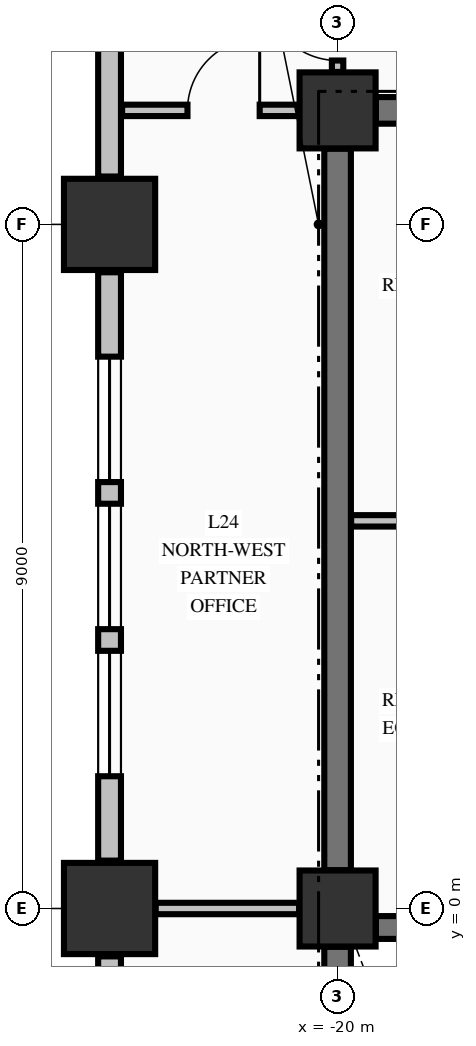
"""IFC4 building model, lengths in metres.
Left out: names, types, materials, properties, quantities, classifications, styles, units other than length and angle.
Written with IfcOpenShell. Run it as: python <this file> out.ifc"""

import sys

from ifc_helpers import new_model, si_unit, direction, frame, frame_2d, origin, origin_2d, place, context, subcontext, project, spatial, rectangle, extrude, element, fill, save


model = new_model("IFC4")
c1 = context("Model", 3, precision=1e-05, world=origin(), true_north=direction((0.0, 1.0)))
c2 = subcontext(c1, "Body", "Model", "MODEL_VIEW")
j1 = project(units=[si_unit("LENGTHUNIT", "METRE"), si_unit("PLANEANGLEUNIT", "RADIAN")], contexts=[c1])
p1 = place(None, origin())
s1 = spatial("IfcSite", under=j1, at=p1, CompositionType="ELEMENT")
p2 = place(p1, origin())
s2 = spatial("IfcBuilding", under=s1, at=p2, CompositionType="ELEMENT")
p3 = place(p2, frame((0.0, 0.0, 98.5)))
s3 = spatial("IfcBuildingStorey", under=s2, at=p3, CompositionType="ELEMENT", Elevation=98.5)
for number, where, z_axis, x_axis in (
    (1, (-23.0, 0.0, -0.275), (0.0, 0.0, 1.0), (1.0, 0.0, 0.0)),
    (2, (-23.0, 9.0, -0.275), (0.0, 0.0, 1.0), (1.0, 0.0, 0.0)),
):
    element("IfcColumn", number, at=place(p3, frame(where, z_axis=z_axis, x_axis=x_axis)), inside=s3, PredefinedType="COLUMN", context=c2, shape_type="SweptSolid", body=[
        extrude(rectangle(XDim=1.2, YDim=1.2, at=origin_2d()), origin(), (0.0, 0.0, 1.0), 3.595),
    ])
for number, where, z_axis, x_axis in (
    (3, (-20.0, 10.5, -0.275), (0.0, 0.0, 1.0), (1.0, 0.0, 0.0)),
    (4, (-20.0, 0.0, -0.275), (0.0, 0.0, 1.0), (1.0, 0.0, 0.0)),
):
    element("IfcColumn", number, at=place(p3, frame(where, z_axis=z_axis, x_axis=x_axis)), inside=s3, PredefinedType="COLUMN", context=c2, shape_type="SweptSolid", body=[
        extrude(rectangle(XDim=1.0, YDim=1.0, at=origin_2d()), origin(), (0.0, 0.0, 1.0), 3.595),
    ])
p4 = place(p3, frame((-23.0, -0.63, 0.0), z_axis=(0.0, 0.0, 1.0), x_axis=(0.0, -1.0, 0.0)))
e5 = element("IfcWall", 5, at=p4, inside=s3, PredefinedType="STANDARD", context=c2, shape_type="SweptSolid", body=[
    extrude(rectangle(XDim=7.74, YDim=0.3, at=frame_2d((3.87, 0.0))), origin(), (0.0, 0.0, 1.0), 2.712),
])
p5 = place(p4, frame((1.11, 0.0, 0.8)))
e6 = element("IfcOpeningElement", 6, at=p5, cuts=e5, PredefinedType="OPENING", context=c2, shape_type="SweptSolid", body=[
    extrude(rectangle(XDim=1.65, YDim=1.7, at=frame_2d((0.825, 0.85))), frame((0.0, 0.16, 0.0), z_axis=(0.0, -1.0, 0.0), x_axis=(1.0, 0.0, 0.0)), (0.0, 0.0, 1.0), 0.32),
])
p6 = place(p4, frame((3.045, 0.0, 0.8)))
e7 = element("IfcOpeningElement", 7, at=p6, cuts=e5, PredefinedType="OPENING", context=c2, shape_type="SweptSolid", body=[
    extrude(rectangle(XDim=1.65, YDim=1.7, at=frame_2d((0.825, 0.85))), frame((0.0, 0.16, 0.0), z_axis=(0.0, -1.0, 0.0), x_axis=(1.0, 0.0, 0.0)), (0.0, 0.0, 1.0), 0.32),
])
p7 = place(p4, frame((4.98, 0.0, 0.8)))
e8 = element("IfcOpeningElement", 8, at=p7, cuts=e5, PredefinedType="OPENING", context=c2, shape_type="SweptSolid", body=[
    extrude(rectangle(XDim=1.65, YDim=1.7, at=frame_2d((0.825, 0.85))), frame((0.0, 0.16, 0.0), z_axis=(0.0, -1.0, 0.0), x_axis=(1.0, 0.0, 0.0)), (0.0, 0.0, 1.0), 0.32),
])
p8 = place(p3, frame((-23.0, 8.37, 0.0), z_axis=(0.0, 0.0, 1.0), x_axis=(0.0, -1.0, 0.0)))
e9 = element("IfcWall", 9, at=p8, inside=s3, PredefinedType="STANDARD", context=c2, shape_type="SweptSolid", body=[
    extrude(rectangle(XDim=7.74, YDim=0.3, at=frame_2d((3.87, 0.0))), origin(), (0.0, 0.0, 1.0), 2.712),
])
p9 = place(p8, frame((1.11, 0.0, 0.8)))
e10 = element("IfcOpeningElement", 10, at=p9, cuts=e9, PredefinedType="OPENING", context=c2, shape_type="SweptSolid", body=[
    extrude(rectangle(XDim=1.65, YDim=1.7, at=frame_2d((0.825, 0.85))), frame((0.0, 0.16, 0.0), z_axis=(0.0, -1.0, 0.0), x_axis=(1.0, 0.0, 0.0)), (0.0, 0.0, 1.0), 0.32),
])
p10 = place(p8, frame((3.045, 0.0, 0.8)))
e11 = element("IfcOpeningElement", 11, at=p10, cuts=e9, PredefinedType="OPENING", context=c2, shape_type="SweptSolid", body=[
    extrude(rectangle(XDim=1.65, YDim=1.7, at=frame_2d((0.825, 0.85))), frame((0.0, 0.16, 0.0), z_axis=(0.0, -1.0, 0.0), x_axis=(1.0, 0.0, 0.0)), (0.0, 0.0, 1.0), 0.32),
])
p11 = place(p8, frame((4.98, 0.0, 0.8)))
e12 = element("IfcOpeningElement", 12, at=p11, cuts=e9, PredefinedType="OPENING", context=c2, shape_type="SweptSolid", body=[
    extrude(rectangle(XDim=1.65, YDim=1.7, at=frame_2d((0.825, 0.85))), frame((0.0, 0.16, 0.0), z_axis=(0.0, -1.0, 0.0), x_axis=(1.0, 0.0, 0.0)), (0.0, 0.0, 1.0), 0.32),
])
p12 = place(p3, frame((-23.0, 20.37, 0.0), z_axis=(0.0, 0.0, 1.0), x_axis=(0.0, -1.0, 0.0)))
e13 = element("IfcWall", 13, at=p12, inside=s3, PredefinedType="STANDARD", context=c2, shape_type="SweptSolid", body=[
    extrude(rectangle(XDim=10.74, YDim=0.3, at=frame_2d((5.37, 0.0))), origin(), (0.0, 0.0, 1.0), 2.712),
])
p13 = place(p3, frame((-19.496, -0.25, 0.0), z_axis=(0.0, 0.0, 1.0), x_axis=(1.0, 0.0, 0.0)))
e14 = element("IfcWall", 14, at=p13, inside=s3, PredefinedType="SHEAR", context=c2, shape_type="SweptSolid", body=[
    extrude(rectangle(XDim=7.992, YDim=0.3, at=frame_2d((3.996, 0.0))), origin(), (0.0, 0.0, 1.0), 3.32),
])
p14 = place(p13, frame((5.796, 0.0, 0.0)))
e15 = element("IfcOpeningElement", 15, at=p14, cuts=e14, PredefinedType="OPENING", context=c2, shape_type="SweptSolid", body=[
    extrude(rectangle(XDim=1.1, YDim=2.15, at=frame_2d((0.55, 1.075))), frame((0.0, 0.16, 0.0), z_axis=(0.0, -1.0, 0.0), x_axis=(1.0, 0.0, 0.0)), (0.0, 0.0, 1.0), 0.32),
])
p15 = place(p3, frame((-19.496, 10.5, 0.0), z_axis=(0.0, 0.0, 1.0), x_axis=(1.0, 0.0, 0.0)))
e16 = element("IfcWall", 16, at=p15, inside=s3, PredefinedType="SHEAR", context=c2, shape_type="SweptSolid", body=[
    extrude(rectangle(XDim=4.796, YDim=0.35, at=frame_2d((2.398, 0.0))), origin(), (0.0, 0.0, 1.0), 3.32),
])
p16 = place(p15, frame((0.471, 0.0, 0.0)))
e17 = element("IfcOpeningElement", 17, at=p16, cuts=e16, PredefinedType="OPENING", context=c2, shape_type="SweptSolid", body=[
    extrude(rectangle(XDim=0.95, YDim=2.15, at=frame_2d((0.475, 1.075))), frame((0.0, 0.185, 0.0), z_axis=(0.0, -1.0, 0.0), x_axis=(1.0, 0.0, 0.0)), (0.0, 0.0, 1.0), 0.37),
])
p17 = place(p15, frame((3.046, 0.0, 0.0)))
e18 = element("IfcOpeningElement", 18, at=p17, cuts=e16, PredefinedType="OPENING", context=c2, shape_type="SweptSolid", body=[
    extrude(rectangle(XDim=0.9, YDim=2.15, at=frame_2d((0.45, 1.075))), frame((0.0, 0.185, 0.0), z_axis=(0.0, -1.0, 0.0), x_axis=(1.0, 0.0, 0.0)), (0.0, 0.0, 1.0), 0.37),
])
p18 = place(p3, frame((-22.394, 0.0, 0.0), z_axis=(0.0, 0.0, 1.0), x_axis=(1.0, 0.0, 0.0)))
e19 = element("IfcWall", 19, at=p18, inside=s3, PredefinedType="PARTITIONING", context=c2, shape_type="SweptSolid", body=[
    extrude(rectangle(XDim=1.888, YDim=0.15, at=frame_2d((0.944, 0.0))), origin(), (0.0, 0.0, 1.0), 2.81),
])
p19 = place(p3, frame((-19.822, 5.1, 0.0), z_axis=(0.0, 0.0, 1.0), x_axis=(1.0, 0.0, 0.0)))
e20 = element("IfcWall", 20, at=p19, inside=s3, PredefinedType="PARTITIONING", context=c2, shape_type="SweptSolid", body=[
    extrude(rectangle(XDim=2.547, YDim=0.15, at=frame_2d((1.273, 0.0))), origin(), (0.0, 0.0, 1.0), 3.32),
])
p20 = place(p19, frame((0.797, 0.0, 0.0)))
e21 = element("IfcOpeningElement", 21, at=p20, cuts=e20, PredefinedType="OPENING", context=c2, shape_type="SweptSolid", body=[
    extrude(rectangle(XDim=0.95, YDim=2.15, at=frame_2d((0.475, 1.075))), frame((0.0, 0.085, 0.0), z_axis=(0.0, -1.0, 0.0), x_axis=(1.0, 0.0, 0.0)), (0.0, 0.0, 1.0), 0.17),
])
p21 = place(p3, frame((-22.835, 10.5, 0.0), z_axis=(0.0, 0.0, 1.0), x_axis=(1.0, 0.0, 0.0)))
e22 = element("IfcWall", 22, at=p21, inside=s3, PredefinedType="PARTITIONING", context=c2, shape_type="SweptSolid", body=[
    extrude(rectangle(XDim=2.329, YDim=0.15, at=frame_2d((1.165, 0.0))), origin(), (0.0, 0.0, 1.0), 3.32),
])
p22 = place(p21, frame((0.86, 0.0, 0.0)))
e23 = element("IfcOpeningElement", 23, at=p22, cuts=e22, PredefinedType="OPENING", context=c2, shape_type="SweptSolid", body=[
    extrude(rectangle(XDim=0.95, YDim=2.15, at=frame_2d((0.475, 1.075))), frame((0.0, 0.085, 0.0), z_axis=(0.0, -1.0, 0.0), x_axis=(1.0, 0.0, 0.0)), (0.0, 0.0, 1.0), 0.17),
])
p23 = place(p3, frame((-20.0, -9.446, 0.0), z_axis=(0.0, 0.0, 1.0), x_axis=(0.0, 1.0, 0.0)))
e24 = element("IfcWall", 24, at=p23, inside=s3, PredefinedType="SHEAR", context=c2, shape_type="SweptSolid", body=[
    extrude(rectangle(XDim=8.942, YDim=0.35, at=frame_2d((4.471, 0.0))), origin(), (0.0, 0.0, 1.0), 3.32),
])
p24 = place(p3, frame((-20.0, 0.504, 0.0), z_axis=(0.0, 0.0, 1.0), x_axis=(0.0, 1.0, 0.0)))
e25 = element("IfcWall", 25, at=p24, inside=s3, PredefinedType="SHEAR", context=c2, shape_type="SweptSolid", body=[
    extrude(rectangle(XDim=9.492, YDim=0.35, at=frame_2d((4.746, 0.0))), origin(), (0.0, 0.0, 1.0), 3.32),
])
p25 = place(p3, frame((-20.0, 11.006, 0.0), z_axis=(0.0, 0.0, 1.0), x_axis=(0.0, 1.0, 0.0)))
e26 = element("IfcWall", 26, at=p25, inside=s3, PredefinedType="PARTITIONING", context=c2, shape_type="SweptSolid", body=[
    extrude(rectangle(XDim=1.666, YDim=0.15, at=frame_2d((0.833, 0.0))), origin(), (0.0, 0.0, 1.0), 2.81),
])
p26 = place(p25, frame((0.15, 0.0, 0.0)))
e27 = element("IfcOpeningElement", 27, at=p26, cuts=e26, PredefinedType="OPENING", context=c2, shape_type="SweptSolid", body=[
    extrude(rectangle(XDim=0.95, YDim=2.15, at=frame_2d((0.475, 1.075))), frame((0.0, 0.085, 0.0), z_axis=(0.0, -1.0, 0.0), x_axis=(1.0, 0.0, 0.0)), (0.0, 0.0, 1.0), 0.17),
])
p27 = place(p9, origin())
e28 = element("IfcWindow", 28, at=p27, inside=s3, PartitioningType="SINGLE_PANEL", PredefinedType="WINDOW", context=c2, shape_type="SweptSolid", body=[
    extrude(rectangle(XDim=1.65, YDim=1.7, at=frame_2d((0.825, 0.85))), frame((0.0, 0.03, 0.0), z_axis=(0.0, -1.0, 0.0), x_axis=(1.0, 0.0, 0.0)), (0.0, 0.0, 1.0), 0.06),
])
fill(e10, e28)
p28 = place(p10, origin())
e29 = element("IfcWindow", 29, at=p28, inside=s3, PartitioningType="SINGLE_PANEL", PredefinedType="WINDOW", context=c2, shape_type="SweptSolid", body=[
    extrude(rectangle(XDim=1.65, YDim=1.7, at=frame_2d((0.825, 0.85))), frame((0.0, 0.03, 0.0), z_axis=(0.0, -1.0, 0.0), x_axis=(1.0, 0.0, 0.0)), (0.0, 0.0, 1.0), 0.06),
])
fill(e11, e29)
p29 = place(p11, origin())
e30 = element("IfcWindow", 30, at=p29, inside=s3, PartitioningType="SINGLE_PANEL", PredefinedType="WINDOW", context=c2, shape_type="SweptSolid", body=[
    extrude(rectangle(XDim=1.65, YDim=1.7, at=frame_2d((0.825, 0.85))), frame((0.0, 0.03, 0.0), z_axis=(0.0, -1.0, 0.0), x_axis=(1.0, 0.0, 0.0)), (0.0, 0.0, 1.0), 0.06),
])
fill(e12, e30)
p30 = place(p26, origin())
e31 = element("IfcDoor", 31, at=p30, inside=s3, OperationType="SINGLE_SWING_RIGHT", PredefinedType="DOOR", context=c2, shape_type="SweptSolid", body=[
    extrude(rectangle(XDim=0.95, YDim=2.15, at=frame_2d((0.475, 1.075))), frame((0.0, 0.025, 0.0), z_axis=(0.0, -1.0, 0.0), x_axis=(1.0, 0.0, 0.0)), (0.0, 0.0, 1.0), 0.05),
])
fill(e27, e31)
p31 = place(p22, origin())
e32 = element("IfcDoor", 32, at=p31, inside=s3, OperationType="SINGLE_SWING_RIGHT", PredefinedType="DOOR", context=c2, shape_type="SweptSolid", body=[
    extrude(rectangle(XDim=0.95, YDim=2.15, at=frame_2d((0.475, 1.075))), frame((0.0, 0.025, 0.0), z_axis=(0.0, -1.0, 0.0), x_axis=(1.0, 0.0, 0.0)), (0.0, 0.0, 1.0), 0.05),
])
fill(e23, e32)
save(model, sys.argv[1])
